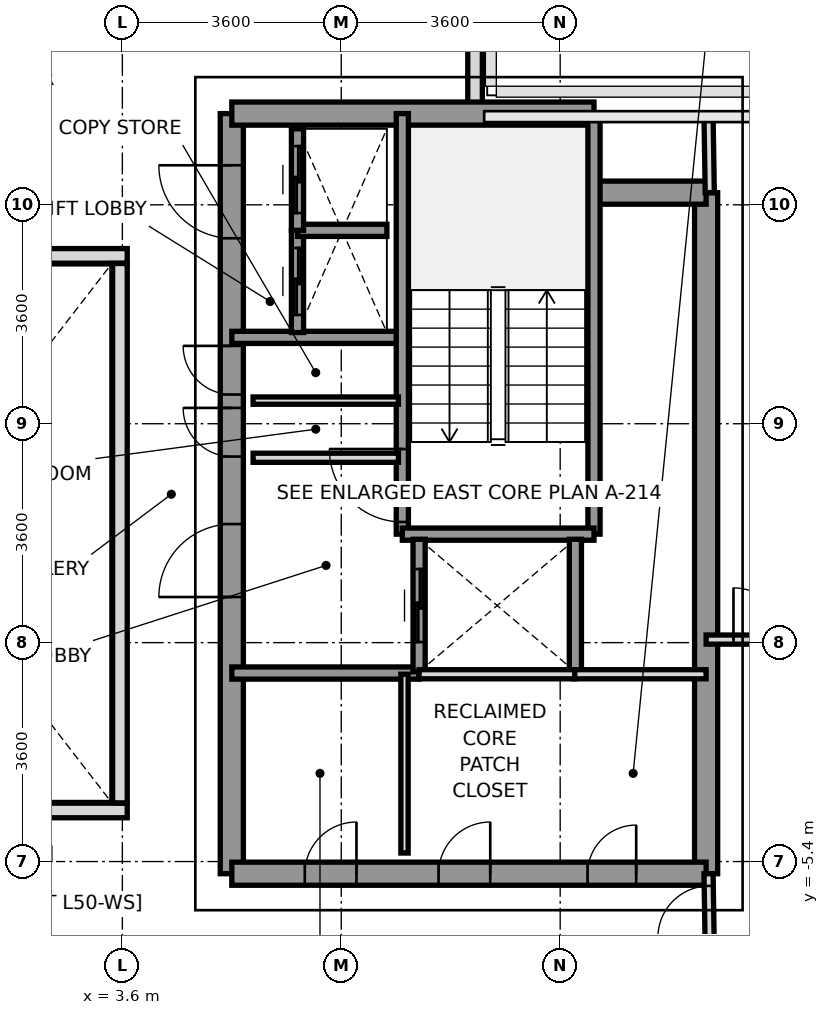
"""IFC4 building model, lengths in metres.
Left out: names, types, materials, properties, quantities, classifications, styles, units other than length and angle.
Written with IfcOpenShell. Run it as: python <this file> out.ifc"""

import sys

from ifc_helpers import new_model, si_unit, direction, frame, frame_2d, origin, place, context, subcontext, project, spatial, rectangle, extrude, source, transform, mapped, element, fill, save


model = new_model("IFC4")
c1 = context("Model", 3, precision=1e-05, world=origin(), true_north=direction((0.0, 1.0)))
c2 = subcontext(c1, "Body", "Model", "MODEL_VIEW")
j1 = project(units=[si_unit("LENGTHUNIT", "METRE"), si_unit("PLANEANGLEUNIT", "RADIAN")], contexts=[c1])
p1 = place(None, origin())
s1 = spatial("IfcSite", under=j1, at=p1, CompositionType="ELEMENT")
p2 = place(p1, origin())
s2 = spatial("IfcBuilding", under=s1, at=p2, CompositionType="ELEMENT")
p3 = place(p2, frame((0.0, 0.0, 184.2)))
s3 = spatial("IfcBuildingStorey", under=s2, at=p3, CompositionType="ELEMENT", Elevation=184.2)
p4 = place(p3, frame((9.4, 8.547, 0.0), z_axis=(0.0, 0.0, 1.0), x_axis=(0.0, -1.0, 0.0)))
e1 = element("IfcWall", 1, at=p4, inside=s3, PredefinedType="PARAPET", context=c2, shape_type="SweptSolid", body=[
    extrude(rectangle(XDim=1.594, YDim=0.24, at=frame_2d((0.797, 0.0))), origin(), (0.0, 0.0, 1.0), 1.15),
])
p5 = place(p3, frame((13.2, -5.6, 0.0), z_axis=(0.0, 0.0, 1.0), x_axis=(0.0, 1.0, 0.0)))
e2 = element("IfcWall", 2, at=p5, inside=s3, PredefinedType="SHEAR", context=c2, shape_type="SweptSolid", body=[
    extrude(rectangle(XDim=11.2, YDim=0.38, at=frame_2d((5.6, 0.0))), origin(), (0.0, 0.0, 1.0), 3.2),
])
p6 = place(p3, frame((5.4, -5.6, 0.0), z_axis=(0.0, 0.0, 1.0), x_axis=(0.0, 1.0, 0.0)))
e3 = element("IfcWall", 3, at=p6, inside=s3, PredefinedType="SHEAR", context=c2, shape_type="SweptSolid", body=[
    extrude(rectangle(XDim=12.5, YDim=0.38, at=frame_2d((6.25, 0.0))), origin(), (0.0, 0.0, 1.0), 3.2),
])
p7 = place(p6, frame((4.55, 0.0, 0.0)))
e4 = element("IfcOpeningElement", 4, at=p7, cuts=e3, PredefinedType="OPENING", context=c2, shape_type="SweptSolid", body=[
    extrude(rectangle(XDim=1.2, YDim=2.2, at=frame_2d((0.6, 1.1))), frame((0.0, 0.2, 0.0), z_axis=(0.0, -1.0, 0.0), x_axis=(1.0, 0.0, 0.0)), (0.0, 0.0, 1.0), 0.4),
])
p8 = place(p6, frame((10.45, 0.0, 0.0)))
e5 = element("IfcOpeningElement", 5, at=p8, cuts=e3, PredefinedType="OPENING", context=c2, shape_type="SweptSolid", body=[
    extrude(rectangle(XDim=1.2, YDim=2.2, at=frame_2d((0.6, 1.1))), frame((0.0, 0.2, 0.0), z_axis=(0.0, -1.0, 0.0), x_axis=(1.0, 0.0, 0.0)), (0.0, 0.0, 1.0), 0.4),
])
p9 = place(p6, frame((6.86, 0.0, 0.0)))
e6 = element("IfcOpeningElement", 6, at=p9, cuts=e3, PredefinedType="OPENING", context=c2, shape_type="SweptSolid", body=[
    extrude(rectangle(XDim=0.8, YDim=2.1, at=frame_2d((0.4, 1.05))), frame((0.0, 0.2, 0.0), z_axis=(0.0, -1.0, 0.0), x_axis=(1.0, 0.0, 0.0)), (0.0, 0.0, 1.0), 0.4),
])
p10 = place(p6, frame((7.88, 0.0, 0.0)))
e7 = element("IfcOpeningElement", 7, at=p10, cuts=e3, PredefinedType="OPENING", context=c2, shape_type="SweptSolid", body=[
    extrude(rectangle(XDim=0.8, YDim=2.1, at=frame_2d((0.4, 1.05))), frame((0.0, 0.2, 0.0), z_axis=(0.0, -1.0, 0.0), x_axis=(1.0, 0.0, 0.0)), (0.0, 0.0, 1.0), 0.4),
])
p11 = place(p3, frame((5.4, 6.9, 0.0), z_axis=(0.0, 0.0, 1.0), x_axis=(1.0, 0.0, 0.0)))
e8 = element("IfcWall", 8, at=p11, inside=s3, PredefinedType="SHEAR", context=c2, shape_type="SweptSolid", body=[
    extrude(rectangle(XDim=5.956, YDim=0.38, at=frame_2d((2.978, 0.0))), origin(), (0.0, 0.0, 1.0), 3.2),
])
p12 = place(p3, frame((11.356, 5.6, 0.0), z_axis=(0.0, 0.0, 1.0), x_axis=(1.0, 0.0, 0.0)))
e9 = element("IfcWall", 9, at=p12, inside=s3, PredefinedType="SHEAR", context=c2, shape_type="SweptSolid", body=[
    extrude(rectangle(XDim=1.844, YDim=0.38, at=frame_2d((0.922, 0.0))), origin(), (0.0, 0.0, 1.0), 3.2),
])
p13 = place(p3, frame((5.4, -5.6, 0.0), z_axis=(0.0, 0.0, 1.0), x_axis=(1.0, 0.0, 0.0)))
e10 = element("IfcWall", 10, at=p13, inside=s3, PredefinedType="SHEAR", context=c2, shape_type="SweptSolid", body=[
    extrude(rectangle(XDim=7.8, YDim=0.38, at=frame_2d((3.9, 0.0))), origin(), (0.0, 0.0, 1.0), 3.2),
])
p14 = place(p13, frame((5.85, 0.0, 0.0)))
e11 = element("IfcOpeningElement", 11, at=p14, cuts=e10, PredefinedType="OPENING", context=c2, shape_type="SweptSolid", body=[
    extrude(rectangle(XDim=0.8, YDim=2.1, at=frame_2d((0.4, 1.05))), frame((0.0, 0.2, 0.0), z_axis=(0.0, -1.0, 0.0), x_axis=(1.0, 0.0, 0.0)), (0.0, 0.0, 1.0), 0.4),
])
p15 = place(p13, frame((1.2, 0.0, 0.0)))
e12 = element("IfcOpeningElement", 12, at=p15, cuts=e10, PredefinedType="OPENING", context=c2, shape_type="SweptSolid", body=[
    extrude(rectangle(XDim=0.85, YDim=2.1, at=frame_2d((0.425, 1.05))), frame((0.0, 0.2, 0.0), z_axis=(0.0, -1.0, 0.0), x_axis=(1.0, 0.0, 0.0)), (0.0, 0.0, 1.0), 0.4),
])
p16 = place(p13, frame((3.4, 0.0, 0.0)))
e13 = element("IfcOpeningElement", 13, at=p16, cuts=e10, PredefinedType="OPENING", context=c2, shape_type="SweptSolid", body=[
    extrude(rectangle(XDim=0.85, YDim=2.1, at=frame_2d((0.425, 1.05))), frame((0.0, 0.2, 0.0), z_axis=(0.0, -1.0, 0.0), x_axis=(1.0, 0.0, 0.0)), (0.0, 0.0, 1.0), 0.4),
])
p17 = place(p3, frame((5.4, 3.22, 0.0), z_axis=(0.0, 0.0, 1.0), x_axis=(1.0, 0.0, 0.0)))
e14 = element("IfcWall", 14, at=p17, inside=s3, PredefinedType="SOLIDWALL", context=c2, shape_type="SweptSolid", body=[
    extrude(rectangle(XDim=2.78, YDim=0.2, at=frame_2d((1.39, 0.0))), origin(), (0.0, 0.0, 1.0), 3.2),
])
p18 = place(p3, frame((5.4, -2.3, 0.0), z_axis=(0.0, 0.0, 1.0), x_axis=(1.0, 0.0, 0.0)))
e15 = element("IfcWall", 15, at=p18, inside=s3, PredefinedType="SOLIDWALL", context=c2, shape_type="SweptSolid", body=[
    extrude(rectangle(XDim=3.08, YDim=0.2, at=frame_2d((1.54, 0.0))), origin(), (0.0, 0.0, 1.0), 3.2),
])
p19 = place(p3, frame((8.204, -0.016, 0.0), z_axis=(0.0, 0.0, 1.0), x_axis=(0.0, 1.0, 0.0)))
e16 = element("IfcWall", 16, at=p19, inside=s3, PredefinedType="SOLIDWALL", context=c2, shape_type="SweptSolid", body=[
    extrude(rectangle(XDim=6.916, YDim=0.2, at=frame_2d((3.458, 0.0))), origin(), (0.0, 0.0, 1.0), 3.2),
])
p20 = place(p19, frame((0.2, 0.0, 0.0)))
e17 = element("IfcOpeningElement", 17, at=p20, cuts=e16, PredefinedType="OPENING", context=c2, shape_type="SweptSolid", body=[
    extrude(rectangle(XDim=1.2, YDim=2.2, at=frame_2d((0.6, 1.1))), frame((0.0, 0.11, 0.0), z_axis=(0.0, -1.0, 0.0), x_axis=(1.0, 0.0, 0.0)), (0.0, 0.0, 1.0), 0.22),
])
p21 = place(p3, frame((11.356, -0.016, 0.0), z_axis=(0.0, 0.0, 1.0), x_axis=(0.0, 1.0, 0.0)))
e18 = element("IfcWall", 18, at=p21, inside=s3, PredefinedType="SOLIDWALL", context=c2, shape_type="SweptSolid", body=[
    extrude(rectangle(XDim=6.916, YDim=0.2, at=frame_2d((3.458, 0.0))), origin(), (0.0, 0.0, 1.0), 3.2),
])
p22 = place(p3, frame((8.204, -0.016, 0.0), z_axis=(0.0, 0.0, 1.0), x_axis=(1.0, 0.0, 0.0)))
e19 = element("IfcWall", 19, at=p22, inside=s3, PredefinedType="SOLIDWALL", context=c2, shape_type="SweptSolid", body=[
    extrude(rectangle(XDim=3.152, YDim=0.2, at=frame_2d((1.576, 0.0))), origin(), (0.0, 0.0, 1.0), 3.2),
])
p23 = place(p3, frame((8.48, -2.28, 0.0), z_axis=(0.0, 0.0, 1.0), x_axis=(0.0, 1.0, 0.0)))
e20 = element("IfcWall", 20, at=p23, inside=s3, PredefinedType="SOLIDWALL", context=c2, shape_type="SweptSolid", body=[
    extrude(rectangle(XDim=2.18, YDim=0.2, at=frame_2d((1.09, 0.0))), origin(), (0.0, 0.0, 1.0), 3.2),
])
p24 = place(p23, frame((0.49, 0.0, 0.0)))
e21 = element("IfcOpeningElement", 21, at=p24, cuts=e20, PredefinedType="OPENING", context=c2, shape_type="SweptSolid", body=[
    extrude(rectangle(XDim=1.2, YDim=2.2, at=frame_2d((0.6, 1.1))), frame((0.0, 0.11, 0.0), z_axis=(0.0, -1.0, 0.0), x_axis=(1.0, 0.0, 0.0)), (0.0, 0.0, 1.0), 0.22),
])
p25 = place(p3, frame((11.05, -2.28, 0.0), z_axis=(0.0, 0.0, 1.0), x_axis=(0.0, 1.0, 0.0)))
e22 = element("IfcWall", 22, at=p25, inside=s3, PredefinedType="SOLIDWALL", context=c2, shape_type="SweptSolid", body=[
    extrude(rectangle(XDim=2.18, YDim=0.2, at=frame_2d((1.09, 0.0))), origin(), (0.0, 0.0, 1.0), 3.2),
])
p26 = place(p3, frame((6.48, 3.3, 0.0), z_axis=(0.0, 0.0, 1.0), x_axis=(0.0, 1.0, 0.0)))
e23 = element("IfcWall", 23, at=p26, inside=s3, PredefinedType="SOLIDWALL", context=c2, shape_type="SweptSolid", body=[
    extrude(rectangle(XDim=1.68, YDim=0.2, at=frame_2d((0.84, 0.0))), origin(), (0.0, 0.0, 1.0), 3.2),
])
p27 = place(p26, frame((0.29, 0.0, 0.0)))
e24 = element("IfcOpeningElement", 24, at=p27, cuts=e23, PredefinedType="OPENING", context=c2, shape_type="SweptSolid", body=[
    extrude(rectangle(XDim=1.1, YDim=2.2, at=frame_2d((0.55, 1.1))), frame((0.0, 0.11, 0.0), z_axis=(0.0, -1.0, 0.0), x_axis=(1.0, 0.0, 0.0)), (0.0, 0.0, 1.0), 0.22),
])
p28 = place(p3, frame((6.48, 4.98, 0.0), z_axis=(0.0, 0.0, 1.0), x_axis=(1.0, 0.0, 0.0)))
e25 = element("IfcWall", 25, at=p28, inside=s3, PredefinedType="SOLIDWALL", context=c2, shape_type="SweptSolid", body=[
    extrude(rectangle(XDim=1.47, YDim=0.2, at=frame_2d((0.735, 0.0))), origin(), (0.0, 0.0, 1.0), 3.2),
])
p29 = place(p3, frame((6.48, 4.98, 0.0), z_axis=(0.0, 0.0, 1.0), x_axis=(0.0, 1.0, 0.0)))
e26 = element("IfcWall", 26, at=p29, inside=s3, PredefinedType="SOLIDWALL", context=c2, shape_type="SweptSolid", body=[
    extrude(rectangle(XDim=1.67, YDim=0.2, at=frame_2d((0.835, 0.0))), origin(), (0.0, 0.0, 1.0), 3.2),
])
p30 = place(p29, frame((0.285, 0.0, 0.0)))
e27 = element("IfcOpeningElement", 27, at=p30, cuts=e26, PredefinedType="OPENING", context=c2, shape_type="SweptSolid", body=[
    extrude(rectangle(XDim=1.1, YDim=2.2, at=frame_2d((0.55, 1.1))), frame((0.0, 0.11, 0.0), z_axis=(0.0, -1.0, 0.0), x_axis=(1.0, 0.0, 0.0)), (0.0, 0.0, 1.0), 0.22),
])
p31 = place(p3, frame((5.75, 1.24, 0.0), z_axis=(0.0, 0.0, 1.0), x_axis=(1.0, 0.0, 0.0)))
e28 = element("IfcWall", 28, at=p31, inside=s3, PredefinedType="PARTITIONING", context=c2, shape_type="SweptSolid", body=[
    extrude(rectangle(XDim=2.39, YDim=0.15, at=frame_2d((1.195, 0.0))), origin(), (0.0, 0.0, 1.0), 2.3),
])
p32 = place(p3, frame((5.75, 2.18, 0.0), z_axis=(0.0, 0.0, 1.0), x_axis=(1.0, 0.0, 0.0)))
e29 = element("IfcWall", 29, at=p32, inside=s3, PredefinedType="PARTITIONING", context=c2, shape_type="SweptSolid", body=[
    extrude(rectangle(XDim=2.39, YDim=0.12, at=frame_2d((1.195, 0.0))), origin(), (0.0, 0.0, 1.0), 2.3),
])
p33 = place(p3, frame((11.02, -2.32, 0.0), z_axis=(0.0, 0.0, 1.0), x_axis=(1.0, 0.0, 0.0)))
e30 = element("IfcWall", 30, at=p33, inside=s3, PredefinedType="PARTITIONING", context=c2, shape_type="SweptSolid", body=[
    extrude(rectangle(XDim=2.18, YDim=0.15, at=frame_2d((1.09, 0.0))), origin(), (0.0, 0.0, 1.0), 3.2),
])
p34 = place(p3, frame((8.24, -5.26, 0.0), z_axis=(0.0, 0.0, 1.0), x_axis=(0.0, 1.0, 0.0)))
e31 = element("IfcWall", 31, at=p34, inside=s3, PredefinedType="PARTITIONING", context=c2, shape_type="SweptSolid", body=[
    extrude(rectangle(XDim=2.94, YDim=0.12, at=frame_2d((1.47, 0.0))), origin(), (0.0, 0.0, 1.0), 3.2),
])
p35 = place(p3, frame((8.48, -2.32, 0.0), z_axis=(0.0, 0.0, 1.0), x_axis=(1.0, 0.0, 0.0)))
e32 = element("IfcWall", 32, at=p35, inside=s3, PredefinedType="PARTITIONING", context=c2, shape_type="SweptSolid", body=[
    extrude(rectangle(XDim=2.56, YDim=0.15, at=frame_2d((1.28, 0.0))), origin(), (0.0, 0.0, 1.0), 3.2),
])
p36 = place(p3, frame((13.26, -6.85, 0.0), z_axis=(0.0, 0.0, 1.0), x_axis=(-0.016013571389, 0.999871774545, 0.0)))
e33 = element("IfcWall", 33, at=p36, inside=s3, PredefinedType="PARTITIONING", context=c2, shape_type="SweptSolid", body=[
    extrude(rectangle(XDim=1.25, YDim=0.15, at=frame_2d((0.625, 0.0))), origin(), (0.0, 0.0, 1.0), 3.2),
])
p37 = place(p36, frame((0.2, 0.0, 0.0)))
e34 = element("IfcOpeningElement", 34, at=p37, cuts=e33, PredefinedType="OPENING", context=c2, shape_type="SweptSolid", body=[
    extrude(rectangle(XDim=0.85, YDim=2.1, at=frame_2d((0.425, 1.05))), frame((0.0, 0.085, 0.0), z_axis=(0.0, -1.0, 0.0), x_axis=(1.0, 0.0, 0.0)), (0.0, 0.0, 1.0), 0.17),
])
p38 = place(p3, frame((13.26, 5.6, 0.0), z_axis=(0.0, 0.0, 1.0), x_axis=(-0.016013571389, 0.999871774545, 0.0)))
e35 = element("IfcWall", 35, at=p38, inside=s3, PredefinedType="PARTITIONING", context=c2, shape_type="SweptSolid", body=[
    extrude(rectangle(XDim=1.25, YDim=0.15, at=frame_2d((0.625, 0.0))), origin(), (0.0, 0.0, 1.0), 3.2),
])
p39 = place(p3, frame((13.2, -1.75, 0.0), z_axis=(0.0, 0.0, 1.0), x_axis=(1.0, 0.0, 0.0)))
e36 = element("IfcWall", 36, at=p39, inside=s3, PredefinedType="PARTITIONING", context=c2, shape_type="SweptSolid", body=[
    extrude(rectangle(XDim=4.45, YDim=0.15, at=frame_2d((2.225, 0.0))), origin(), (0.0, 0.0, 1.0), 2.8),
])
p40 = place(p39, frame((0.45, 0.0, 0.0)))
e37 = element("IfcOpeningElement", 37, at=p40, cuts=e36, PredefinedType="OPENING", context=c2, shape_type="SweptSolid", body=[
    extrude(rectangle(XDim=0.85, YDim=2.1, at=frame_2d((0.425, 1.05))), frame((0.0, 0.085, 0.0), z_axis=(0.0, -1.0, 0.0), x_axis=(1.0, 0.0, 0.0)), (0.0, 0.0, 1.0), 0.17),
])
for number, where, z_axis, x_axis in (
    (38, (-3.68, -4.56, 0.0), (0.0, 0.0, 1.0), (1.0, 0.0, 0.0)),
    (39, (-3.68, 4.56, 0.0), (0.0, 0.0, 1.0), (1.0, 0.0, 0.0)),
):
    element("IfcWall", number, at=place(p3, frame(where, z_axis=z_axis, x_axis=x_axis)), inside=s3, PredefinedType="PARAPET", context=c2, shape_type="SweptSolid", body=[
        extrude(rectangle(XDim=7.36, YDim=0.24, at=frame_2d((3.68, 0.0))), origin(), (0.0, 0.0, 1.0), 1.15),
    ])
p41 = place(p3, frame((3.56, -4.435, 0.0), z_axis=(0.0, 0.0, 1.0), x_axis=(0.0, 1.0, 0.0)))
e40 = element("IfcWall", 40, at=p41, inside=s3, PredefinedType="PARAPET", context=c2, shape_type="SweptSolid", body=[
    extrude(rectangle(XDim=8.87, YDim=0.24, at=frame_2d((4.435, 0.0))), origin(), (0.0, 0.0, 1.0), 1.15),
])
m1 = source(origin(), c2, "Body", "SweptSolid", [
    extrude(rectangle(XDim=1.2, YDim=2.2, at=frame_2d((0.6, 1.1))), frame((0.0, 0.025, 0.0), z_axis=(0.0, -1.0, 0.0), x_axis=(1.0, 0.0, 0.0)), (0.0, 0.0, 1.0), 0.05),
])
p42 = place(p20, origin())
e41 = element("IfcDoor", 41, at=p42, inside=s3, OperationType="SINGLE_SWING_RIGHT", PredefinedType="DOOR", context=c2, shape_type="MappedRepresentation", body=[
    mapped(m1, transform((0.0, 0.0, 0.0), x_axis=(1.0, 0.0, 0.0), y_axis=(0.0, 1.0, 0.0), z_axis=(0.0, 0.0, 1.0), scale=1.0)),
])
fill(e17, e41)
p43 = place(p7, origin())
e42 = element("IfcDoor", 42, at=p43, inside=s3, OperationType="SINGLE_SWING_LEFT", PredefinedType="DOOR", context=c2, shape_type="MappedRepresentation", body=[
    mapped(m1, transform((0.0, 0.0, 0.0), x_axis=(1.0, 0.0, 0.0), y_axis=(0.0, 1.0, 0.0), z_axis=(0.0, 0.0, 1.0), scale=1.0)),
])
fill(e4, e42)
p44 = place(p8, origin())
e43 = element("IfcDoor", 43, at=p44, inside=s3, OperationType="SINGLE_SWING_RIGHT", PredefinedType="DOOR", context=c2, shape_type="MappedRepresentation", body=[
    mapped(m1, transform((0.0, 0.0, 0.0), x_axis=(1.0, 0.0, 0.0), y_axis=(0.0, 1.0, 0.0), z_axis=(0.0, 0.0, 1.0), scale=1.0)),
])
fill(e5, e43)
m2 = source(origin(), c2, "Body", "SweptSolid", [
    extrude(rectangle(XDim=0.8, YDim=2.1, at=frame_2d((0.4, 1.05))), frame((0.0, 0.025, 0.0), z_axis=(0.0, -1.0, 0.0), x_axis=(1.0, 0.0, 0.0)), (0.0, 0.0, 1.0), 0.05),
])
p45 = place(p9, origin())
e44 = element("IfcDoor", 44, at=p45, inside=s3, OperationType="SINGLE_SWING_RIGHT", PredefinedType="DOOR", context=c2, shape_type="MappedRepresentation", body=[
    mapped(m2, transform((0.0, 0.0, 0.0), x_axis=(1.0, 0.0, 0.0), y_axis=(0.0, 1.0, 0.0), z_axis=(0.0, 0.0, 1.0), scale=1.0)),
])
fill(e6, e44)
p46 = place(p10, origin())
e45 = element("IfcDoor", 45, at=p46, inside=s3, OperationType="SINGLE_SWING_RIGHT", PredefinedType="DOOR", context=c2, shape_type="MappedRepresentation", body=[
    mapped(m2, transform((0.0, 0.0, 0.0), x_axis=(1.0, 0.0, 0.0), y_axis=(0.0, 1.0, 0.0), z_axis=(0.0, 0.0, 1.0), scale=1.0)),
])
fill(e7, e45)
p47 = place(p14, origin())
e46 = element("IfcDoor", 46, at=p47, inside=s3, OperationType="SINGLE_SWING_RIGHT", PredefinedType="DOOR", context=c2, shape_type="MappedRepresentation", body=[
    mapped(m2, transform((0.0, 0.0, 0.0), x_axis=(1.0, 0.0, 0.0), y_axis=(0.0, 1.0, 0.0), z_axis=(0.0, 0.0, 1.0), scale=1.0)),
])
fill(e11, e46)
m3 = source(origin(), c2, "Body", "SweptSolid", [
    extrude(rectangle(XDim=0.85, YDim=2.1, at=frame_2d((0.425, 1.05))), frame((0.0, 0.025, 0.0), z_axis=(0.0, -1.0, 0.0), x_axis=(1.0, 0.0, 0.0)), (0.0, 0.0, 1.0), 0.05),
])
p48 = place(p15, origin())
e47 = element("IfcDoor", 47, at=p48, inside=s3, OperationType="SINGLE_SWING_RIGHT", PredefinedType="DOOR", context=c2, shape_type="MappedRepresentation", body=[
    mapped(m3, transform((0.0, 0.0, 0.0), x_axis=(1.0, 0.0, 0.0), y_axis=(0.0, 1.0, 0.0), z_axis=(0.0, 0.0, 1.0), scale=1.0)),
])
fill(e12, e47)
p49 = place(p16, origin())
e48 = element("IfcDoor", 48, at=p49, inside=s3, OperationType="SINGLE_SWING_RIGHT", PredefinedType="DOOR", context=c2, shape_type="MappedRepresentation", body=[
    mapped(m3, transform((0.0, 0.0, 0.0), x_axis=(1.0, 0.0, 0.0), y_axis=(0.0, 1.0, 0.0), z_axis=(0.0, 0.0, 1.0), scale=1.0)),
])
fill(e13, e48)
p50 = place(p24, origin())
e49 = element("IfcDoor", 49, at=p50, inside=s3, OperationType="SLIDING_TO_RIGHT", PredefinedType="DOOR", context=c2, shape_type="MappedRepresentation", body=[
    mapped(m1, transform((0.0, 0.0, 0.0), x_axis=(1.0, 0.0, 0.0), y_axis=(0.0, 1.0, 0.0), z_axis=(0.0, 0.0, 1.0), scale=1.0)),
])
fill(e21, e49)
m4 = source(origin(), c2, "Body", "SweptSolid", [
    extrude(rectangle(XDim=1.1, YDim=2.2, at=frame_2d((0.55, 1.1))), frame((0.0, 0.025, 0.0), z_axis=(0.0, -1.0, 0.0), x_axis=(1.0, 0.0, 0.0)), (0.0, 0.0, 1.0), 0.05),
])
p51 = place(p27, origin())
e50 = element("IfcDoor", 50, at=p51, inside=s3, OperationType="SLIDING_TO_LEFT", PredefinedType="DOOR", context=c2, shape_type="MappedRepresentation", body=[
    mapped(m4, transform((0.0, 0.0, 0.0), x_axis=(1.0, 0.0, 0.0), y_axis=(0.0, 1.0, 0.0), z_axis=(0.0, 0.0, 1.0), scale=1.0)),
])
fill(e24, e50)
p52 = place(p30, origin())
e51 = element("IfcDoor", 51, at=p52, inside=s3, OperationType="SLIDING_TO_LEFT", PredefinedType="DOOR", context=c2, shape_type="MappedRepresentation", body=[
    mapped(m4, transform((0.0, 0.0, 0.0), x_axis=(1.0, 0.0, 0.0), y_axis=(0.0, 1.0, 0.0), z_axis=(0.0, 0.0, 1.0), scale=1.0)),
])
fill(e27, e51)
p53 = place(p37, origin())
e52 = element("IfcDoor", 52, at=p53, inside=s3, OperationType="SINGLE_SWING_LEFT", PredefinedType="DOOR", context=c2, shape_type="MappedRepresentation", body=[
    mapped(m3, transform((0.0, 0.0, 0.0), x_axis=(1.0, 0.0, 0.0), y_axis=(0.0, 1.0, 0.0), z_axis=(0.0, 0.0, 1.0), scale=1.0)),
])
fill(e34, e52)
p54 = place(p40, origin())
e53 = element("IfcDoor", 53, at=p54, inside=s3, OperationType="SINGLE_SWING_LEFT", PredefinedType="DOOR", context=c2, shape_type="MappedRepresentation", body=[
    mapped(m3, transform((0.0, 0.0, 0.0), x_axis=(1.0, 0.0, 0.0), y_axis=(0.0, 1.0, 0.0), z_axis=(0.0, 0.0, 1.0), scale=1.0)),
])
fill(e37, e53)
save(model, sys.argv[1])
